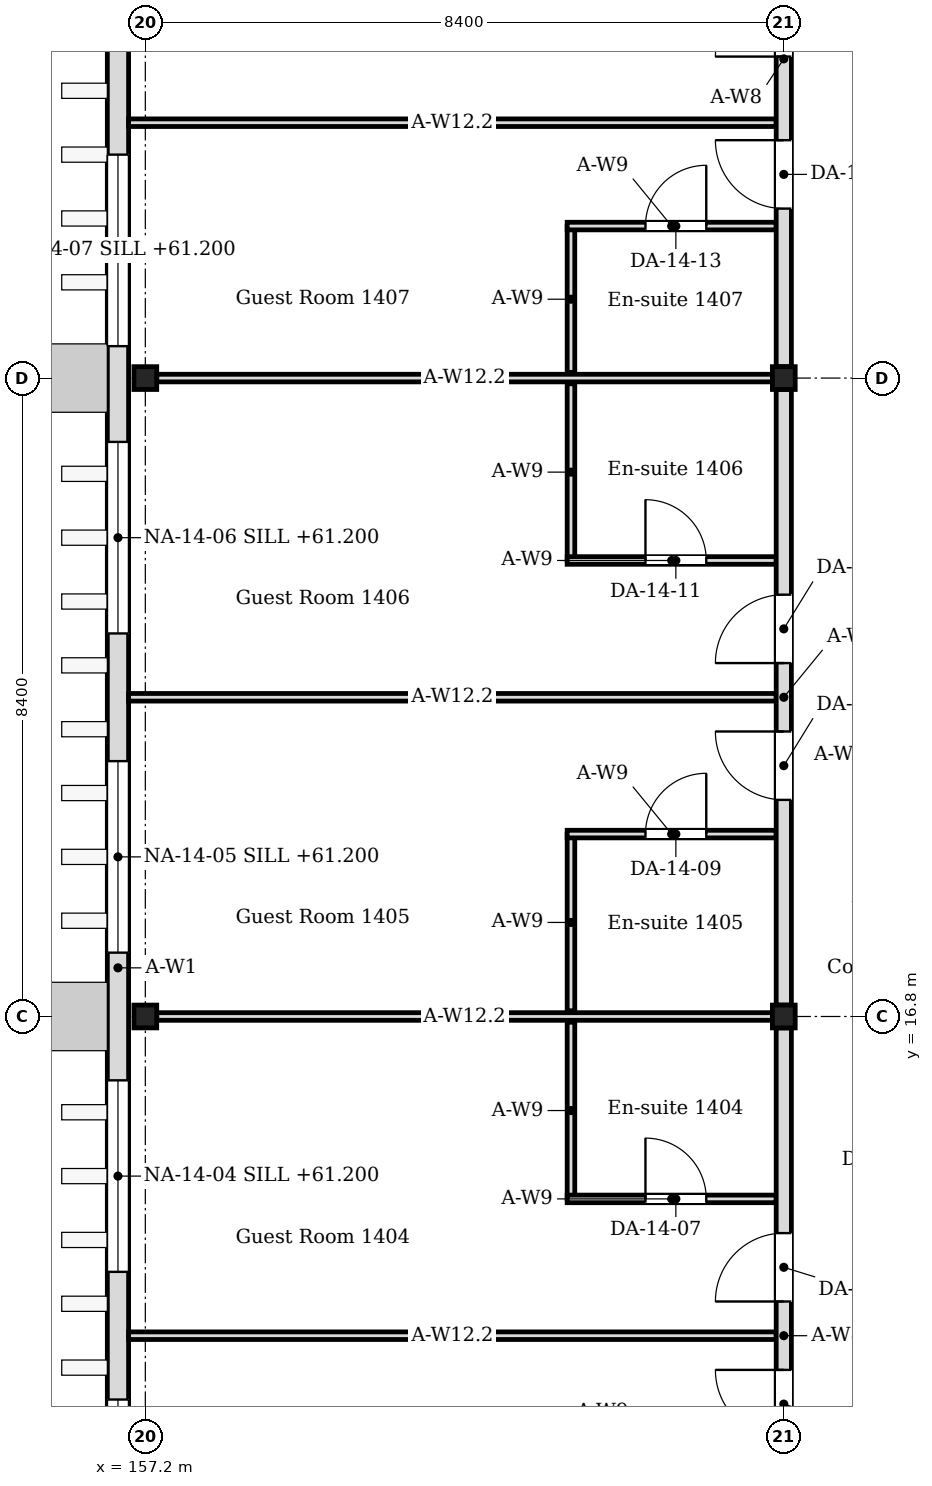
"""IFC4 building model, lengths in metres.
Left out: names, types, materials, properties, quantities, classifications, styles, units other than length and angle.
Written with IfcOpenShell. Run it as: python <this file> out.ifc"""

import sys

from ifc_helpers import new_model, si_unit, direction, frame, frame_2d, origin, origin_2d, place, context, subcontext, project, spatial, rectangle, i_section, extrude, element, fill, save


model = new_model("IFC4")
c1 = context("Model", 3, precision=1e-05, world=origin(), true_north=direction((0.0, 1.0)))
c2 = subcontext(c1, "Body", "Model", "MODEL_VIEW")
j1 = project(units=[si_unit("LENGTHUNIT", "METRE"), si_unit("PLANEANGLEUNIT", "RADIAN")], contexts=[c1])
p1 = place(None, origin())
s1 = spatial("IfcSite", under=j1, at=p1, CompositionType="ELEMENT")
p2 = place(p1, origin())
s2 = spatial("IfcBuilding", under=s1, at=p2, CompositionType="ELEMENT")
p3 = place(p2, frame((0.0, 0.0, 60.6)))
s3 = spatial("IfcBuildingStorey", under=s2, at=p3, CompositionType="ELEMENT", Elevation=60.6)
for number, where, z_axis, x_axis in (
    (1, (157.2, 16.8, 0.0), (0.0, 0.0, 1.0), (1.0, 0.0, 0.0)),
    (2, (157.2, 25.2, 0.0), (0.0, 0.0, 1.0), (1.0, 0.0, 0.0)),
    (3, (165.6, 16.8, 0.0), (0.0, 0.0, 1.0), (1.0, 0.0, 0.0)),
    (4, (165.6, 25.2, 0.0), (0.0, 0.0, 1.0), (1.0, 0.0, 0.0)),
):
    element("IfcColumn", number, at=place(p3, frame(where, z_axis=z_axis, x_axis=x_axis)), inside=s3, PredefinedType="COLUMN", context=c2, shape_type="SweptSolid", body=[
        extrude(i_section(OverallWidth=0.3, OverallDepth=0.3, WebThickness=0.01, FlangeThickness=0.015, FilletRadius=0.013, at=origin_2d()), origin(), (0.0, 0.0, 1.0), 4.2),
    ])
p4 = place(p3, frame((156.84, -0.22, 0.0), z_axis=(0.0, 0.0, 1.0), x_axis=(0.0, 1.0, 0.0)))
e5 = element("IfcWall", 5, at=p4, inside=s3, PredefinedType="SOLIDWALL", context=c2, shape_type="SweptSolid", body=[
    extrude(rectangle(XDim=67.64, YDim=0.28, at=frame_2d((33.82, 0.0))), origin(), (0.0, 0.0, 1.0), 4.05),
])
p5 = place(p4, frame((0.64, 0.0, 0.6)))
e6 = element("IfcOpeningElement", 6, at=p5, cuts=e5, PredefinedType="OPENING", context=c2, shape_type="SweptSolid", body=[
    extrude(rectangle(XDim=2.52, YDim=2.4, at=frame_2d((1.26, 1.2))), frame((0.0, 0.15, 0.0), z_axis=(0.0, -1.0, 0.0), x_axis=(1.0, 0.0, 0.0)), (0.0, 0.0, 1.0), 0.3),
])
p6 = place(p4, frame((4.84, 0.0, 0.6)))
e7 = element("IfcOpeningElement", 7, at=p6, cuts=e5, PredefinedType="OPENING", context=c2, shape_type="SweptSolid", body=[
    extrude(rectangle(XDim=2.52, YDim=2.4, at=frame_2d((1.26, 1.2))), frame((0.0, 0.15, 0.0), z_axis=(0.0, -1.0, 0.0), x_axis=(1.0, 0.0, 0.0)), (0.0, 0.0, 1.0), 0.3),
])
p7 = place(p4, frame((9.46, 0.0, 0.6)))
e8 = element("IfcOpeningElement", 8, at=p7, cuts=e5, PredefinedType="OPENING", context=c2, shape_type="SweptSolid", body=[
    extrude(rectangle(XDim=2.52, YDim=2.4, at=frame_2d((1.26, 1.2))), frame((0.0, 0.15, 0.0), z_axis=(0.0, -1.0, 0.0), x_axis=(1.0, 0.0, 0.0)), (0.0, 0.0, 1.0), 0.3),
])
p8 = place(p4, frame((13.66, 0.0, 0.6)))
e9 = element("IfcOpeningElement", 9, at=p8, cuts=e5, PredefinedType="OPENING", context=c2, shape_type="SweptSolid", body=[
    extrude(rectangle(XDim=2.52, YDim=2.4, at=frame_2d((1.26, 1.2))), frame((0.0, 0.15, 0.0), z_axis=(0.0, -1.0, 0.0), x_axis=(1.0, 0.0, 0.0)), (0.0, 0.0, 1.0), 0.3),
])
p9 = place(p4, frame((17.86, 0.0, 0.6)))
e10 = element("IfcOpeningElement", 10, at=p9, cuts=e5, PredefinedType="OPENING", context=c2, shape_type="SweptSolid", body=[
    extrude(rectangle(XDim=2.52, YDim=2.4, at=frame_2d((1.26, 1.2))), frame((0.0, 0.15, 0.0), z_axis=(0.0, -1.0, 0.0), x_axis=(1.0, 0.0, 0.0)), (0.0, 0.0, 1.0), 0.3),
])
p10 = place(p4, frame((22.06, 0.0, 0.6)))
e11 = element("IfcOpeningElement", 11, at=p10, cuts=e5, PredefinedType="OPENING", context=c2, shape_type="SweptSolid", body=[
    extrude(rectangle(XDim=2.52, YDim=2.4, at=frame_2d((1.26, 1.2))), frame((0.0, 0.15, 0.0), z_axis=(0.0, -1.0, 0.0), x_axis=(1.0, 0.0, 0.0)), (0.0, 0.0, 1.0), 0.3),
])
p11 = place(p4, frame((25.84, 0.0, 0.6)))
e12 = element("IfcOpeningElement", 12, at=p11, cuts=e5, PredefinedType="OPENING", context=c2, shape_type="SweptSolid", body=[
    extrude(rectangle(XDim=2.52, YDim=2.4, at=frame_2d((1.26, 1.2))), frame((0.0, 0.15, 0.0), z_axis=(0.0, -1.0, 0.0), x_axis=(1.0, 0.0, 0.0)), (0.0, 0.0, 1.0), 0.3),
])
p12 = place(p4, frame((30.04, 0.0, 0.6)))
e13 = element("IfcOpeningElement", 13, at=p12, cuts=e5, PredefinedType="OPENING", context=c2, shape_type="SweptSolid", body=[
    extrude(rectangle(XDim=2.52, YDim=2.4, at=frame_2d((1.26, 1.2))), frame((0.0, 0.15, 0.0), z_axis=(0.0, -1.0, 0.0), x_axis=(1.0, 0.0, 0.0)), (0.0, 0.0, 1.0), 0.3),
])
p13 = place(p4, frame((34.66, 0.0, 0.6)))
e14 = element("IfcOpeningElement", 14, at=p13, cuts=e5, PredefinedType="OPENING", context=c2, shape_type="SweptSolid", body=[
    extrude(rectangle(XDim=2.52, YDim=2.4, at=frame_2d((1.26, 1.2))), frame((0.0, 0.15, 0.0), z_axis=(0.0, -1.0, 0.0), x_axis=(1.0, 0.0, 0.0)), (0.0, 0.0, 1.0), 0.3),
])
p14 = place(p4, frame((38.86, 0.0, 0.6)))
e15 = element("IfcOpeningElement", 15, at=p14, cuts=e5, PredefinedType="OPENING", context=c2, shape_type="SweptSolid", body=[
    extrude(rectangle(XDim=2.52, YDim=2.4, at=frame_2d((1.26, 1.2))), frame((0.0, 0.15, 0.0), z_axis=(0.0, -1.0, 0.0), x_axis=(1.0, 0.0, 0.0)), (0.0, 0.0, 1.0), 0.3),
])
p15 = place(p4, frame((42.64, 0.0, 0.6)))
e16 = element("IfcOpeningElement", 16, at=p15, cuts=e5, PredefinedType="OPENING", context=c2, shape_type="SweptSolid", body=[
    extrude(rectangle(XDim=2.52, YDim=2.4, at=frame_2d((1.26, 1.2))), frame((0.0, 0.15, 0.0), z_axis=(0.0, -1.0, 0.0), x_axis=(1.0, 0.0, 0.0)), (0.0, 0.0, 1.0), 0.3),
])
p16 = place(p4, frame((46.84, 0.0, 0.6)))
e17 = element("IfcOpeningElement", 17, at=p16, cuts=e5, PredefinedType="OPENING", context=c2, shape_type="SweptSolid", body=[
    extrude(rectangle(XDim=2.52, YDim=2.4, at=frame_2d((1.26, 1.2))), frame((0.0, 0.15, 0.0), z_axis=(0.0, -1.0, 0.0), x_axis=(1.0, 0.0, 0.0)), (0.0, 0.0, 1.0), 0.3),
])
p17 = place(p4, frame((51.46, 0.0, 0.6)))
e18 = element("IfcOpeningElement", 18, at=p17, cuts=e5, PredefinedType="OPENING", context=c2, shape_type="SweptSolid", body=[
    extrude(rectangle(XDim=2.52, YDim=2.4, at=frame_2d((1.26, 1.2))), frame((0.0, 0.15, 0.0), z_axis=(0.0, -1.0, 0.0), x_axis=(1.0, 0.0, 0.0)), (0.0, 0.0, 1.0), 0.3),
])
p18 = place(p4, frame((55.66, 0.0, 0.6)))
e19 = element("IfcOpeningElement", 19, at=p18, cuts=e5, PredefinedType="OPENING", context=c2, shape_type="SweptSolid", body=[
    extrude(rectangle(XDim=2.52, YDim=2.4, at=frame_2d((1.26, 1.2))), frame((0.0, 0.15, 0.0), z_axis=(0.0, -1.0, 0.0), x_axis=(1.0, 0.0, 0.0)), (0.0, 0.0, 1.0), 0.3),
])
p19 = place(p4, frame((59.86, 0.0, 0.6)))
e20 = element("IfcOpeningElement", 20, at=p19, cuts=e5, PredefinedType="OPENING", context=c2, shape_type="SweptSolid", body=[
    extrude(rectangle(XDim=2.52, YDim=2.4, at=frame_2d((1.26, 1.2))), frame((0.0, 0.15, 0.0), z_axis=(0.0, -1.0, 0.0), x_axis=(1.0, 0.0, 0.0)), (0.0, 0.0, 1.0), 0.3),
])
p20 = place(p4, frame((64.06, 0.0, 0.6)))
e21 = element("IfcOpeningElement", 21, at=p20, cuts=e5, PredefinedType="OPENING", context=c2, shape_type="SweptSolid", body=[
    extrude(rectangle(XDim=2.52, YDim=2.4, at=frame_2d((1.26, 1.2))), frame((0.0, 0.15, 0.0), z_axis=(0.0, -1.0, 0.0), x_axis=(1.0, 0.0, 0.0)), (0.0, 0.0, 1.0), 0.3),
])
p21 = place(p3, frame((162.8, 14.4, 0.0), z_axis=(0.0, 0.0, 1.0), x_axis=(0.0, 1.0, 0.0)))
e22 = element("IfcWall", 22, at=p21, inside=s3, PredefinedType="PARTITIONING", context=c2, shape_type="SweptSolid", body=[
    extrude(rectangle(XDim=2.325, YDim=0.1, at=frame_2d((1.163, 0.0))), origin(), (0.0, 0.0, 1.0), 4.05),
])
p22 = place(p3, frame((162.75, 14.4, 0.0), z_axis=(0.0, 0.0, 1.0), x_axis=(1.0, 0.0, 0.0)))
e23 = element("IfcWall", 23, at=p22, inside=s3, PredefinedType="PARTITIONING", context=c2, shape_type="SweptSolid", body=[
    extrude(rectangle(XDim=2.75, YDim=0.1, at=frame_2d((1.375, 0.0))), origin(), (0.0, 0.0, 1.0), 4.05),
])
p23 = place(p22, frame((1.03, 0.0, 0.0)))
e24 = element("IfcOpeningElement", 24, at=p23, cuts=e23, PredefinedType="OPENING", context=c2, shape_type="SweptSolid", body=[
    extrude(rectangle(XDim=0.8, YDim=2.1, at=frame_2d((0.4, 1.05))), frame((0.0, 0.06, 0.0), z_axis=(0.0, -1.0, 0.0), x_axis=(1.0, 0.0, 0.0)), (0.0, 0.0, 1.0), 0.12),
])
p24 = place(p3, frame((162.8, 16.875, 0.0), z_axis=(0.0, 0.0, 1.0), x_axis=(0.0, 1.0, 0.0)))
e25 = element("IfcWall", 25, at=p24, inside=s3, PredefinedType="PARTITIONING", context=c2, shape_type="SweptSolid", body=[
    extrude(rectangle(XDim=2.325, YDim=0.1, at=frame_2d((1.163, 0.0))), origin(), (0.0, 0.0, 1.0), 4.05),
])
p25 = place(p3, frame((162.75, 19.2, 0.0), z_axis=(0.0, 0.0, 1.0), x_axis=(1.0, 0.0, 0.0)))
e26 = element("IfcWall", 26, at=p25, inside=s3, PredefinedType="PARTITIONING", context=c2, shape_type="SweptSolid", body=[
    extrude(rectangle(XDim=2.75, YDim=0.1, at=frame_2d((1.375, 0.0))), origin(), (0.0, 0.0, 1.0), 4.05),
])
p26 = place(p25, frame((1.03, 0.0, 0.0)))
e27 = element("IfcOpeningElement", 27, at=p26, cuts=e26, PredefinedType="OPENING", context=c2, shape_type="SweptSolid", body=[
    extrude(rectangle(XDim=0.8, YDim=2.1, at=frame_2d((0.4, 1.05))), frame((0.0, 0.06, 0.0), z_axis=(0.0, -1.0, 0.0), x_axis=(1.0, 0.0, 0.0)), (0.0, 0.0, 1.0), 0.12),
])
p27 = place(p3, frame((162.8, 22.8, 0.0), z_axis=(0.0, 0.0, 1.0), x_axis=(0.0, 1.0, 0.0)))
e28 = element("IfcWall", 28, at=p27, inside=s3, PredefinedType="PARTITIONING", context=c2, shape_type="SweptSolid", body=[
    extrude(rectangle(XDim=2.325, YDim=0.1, at=frame_2d((1.163, 0.0))), origin(), (0.0, 0.0, 1.0), 4.05),
])
p28 = place(p3, frame((162.75, 22.8, 0.0), z_axis=(0.0, 0.0, 1.0), x_axis=(1.0, 0.0, 0.0)))
e29 = element("IfcWall", 29, at=p28, inside=s3, PredefinedType="PARTITIONING", context=c2, shape_type="SweptSolid", body=[
    extrude(rectangle(XDim=2.75, YDim=0.1, at=frame_2d((1.375, 0.0))), origin(), (0.0, 0.0, 1.0), 4.05),
])
p29 = place(p28, frame((1.03, 0.0, 0.0)))
e30 = element("IfcOpeningElement", 30, at=p29, cuts=e29, PredefinedType="OPENING", context=c2, shape_type="SweptSolid", body=[
    extrude(rectangle(XDim=0.8, YDim=2.1, at=frame_2d((0.4, 1.05))), frame((0.0, 0.06, 0.0), z_axis=(0.0, -1.0, 0.0), x_axis=(1.0, 0.0, 0.0)), (0.0, 0.0, 1.0), 0.12),
])
p30 = place(p3, frame((162.8, 25.275, 0.0), z_axis=(0.0, 0.0, 1.0), x_axis=(0.0, 1.0, 0.0)))
e31 = element("IfcWall", 31, at=p30, inside=s3, PredefinedType="PARTITIONING", context=c2, shape_type="SweptSolid", body=[
    extrude(rectangle(XDim=1.925, YDim=0.1, at=frame_2d((0.962, 0.0))), origin(), (0.0, 0.0, 1.0), 4.05),
])
p31 = place(p3, frame((162.75, 27.2, 0.0), z_axis=(0.0, 0.0, 1.0), x_axis=(1.0, 0.0, 0.0)))
e32 = element("IfcWall", 32, at=p31, inside=s3, PredefinedType="PARTITIONING", context=c2, shape_type="SweptSolid", body=[
    extrude(rectangle(XDim=2.75, YDim=0.1, at=frame_2d((1.375, 0.0))), origin(), (0.0, 0.0, 1.0), 4.05),
])
p32 = place(p31, frame((1.03, 0.0, 0.0)))
e33 = element("IfcOpeningElement", 33, at=p32, cuts=e32, PredefinedType="OPENING", context=c2, shape_type="SweptSolid", body=[
    extrude(rectangle(XDim=0.8, YDim=2.1, at=frame_2d((0.4, 1.05))), frame((0.0, 0.06, 0.0), z_axis=(0.0, -1.0, 0.0), x_axis=(1.0, 0.0, 0.0)), (0.0, 0.0, 1.0), 0.12),
])
for number, where, z_axis, x_axis in (
    (34, (157.35, 16.8, 0.0), (0.0, 0.0, 1.0), (1.0, 0.0, 0.0)),
    (35, (157.35, 25.2, 0.0), (0.0, 0.0, 1.0), (1.0, 0.0, 0.0)),
):
    element("IfcWall", number, at=place(p3, frame(where, z_axis=z_axis, x_axis=x_axis)), inside=s3, PredefinedType="PARTITIONING", context=c2, shape_type="SweptSolid", body=[
        extrude(rectangle(XDim=8.1, YDim=0.1, at=frame_2d((4.05, 0.0))), origin(), (0.0, 0.0, 1.0), 3.55),
    ])
for number, where, z_axis, x_axis in (
    (36, (156.98, 12.6, 0.0), (0.0, 0.0, 1.0), (1.0, 0.0, 0.0)),
    (37, (156.98, 21.0, 0.0), (0.0, 0.0, 1.0), (1.0, 0.0, 0.0)),
    (38, (156.98, 28.56, 0.0), (0.0, 0.0, 1.0), (1.0, 0.0, 0.0)),
):
    element("IfcWall", number, at=place(p3, frame(where, z_axis=z_axis, x_axis=x_axis)), inside=s3, PredefinedType="PARTITIONING", context=c2, shape_type="SweptSolid", body=[
        extrude(rectangle(XDim=8.52, YDim=0.1, at=frame_2d((4.26, 0.0))), origin(), (0.0, 0.0, 1.0), 3.55),
    ])
p33 = place(p3, frame((165.6, 8.55, 0.0), z_axis=(0.0, 0.0, 1.0), x_axis=(0.0, 1.0, 0.0)))
e39 = element("IfcWall", 39, at=p33, inside=s3, PredefinedType="PARTITIONING", context=c2, shape_type="SweptSolid", body=[
    extrude(rectangle(XDim=8.1, YDim=0.2, at=frame_2d((4.05, 0.0))), origin(), (0.0, 0.0, 1.0), 3.45),
])
p34 = place(p33, frame((2.7, 0.0, 0.0)))
e40 = element("IfcOpeningElement", 40, at=p34, cuts=e39, PredefinedType="OPENING", context=c2, shape_type="SweptSolid", body=[
    extrude(rectangle(XDim=0.9, YDim=2.1, at=frame_2d((0.45, 1.05))), frame((0.0, 0.11, 0.0), z_axis=(0.0, -1.0, 0.0), x_axis=(1.0, 0.0, 0.0)), (0.0, 0.0, 1.0), 0.22),
])
p35 = place(p33, frame((4.5, 0.0, 0.0)))
e41 = element("IfcOpeningElement", 41, at=p35, cuts=e39, PredefinedType="OPENING", context=c2, shape_type="SweptSolid", body=[
    extrude(rectangle(XDim=0.9, YDim=2.1, at=frame_2d((0.45, 1.05))), frame((0.0, 0.11, 0.0), z_axis=(0.0, -1.0, 0.0), x_axis=(1.0, 0.0, 0.0)), (0.0, 0.0, 1.0), 0.22),
])
p36 = place(p3, frame((165.6, 16.95, 0.0), z_axis=(0.0, 0.0, 1.0), x_axis=(0.0, 1.0, 0.0)))
e42 = element("IfcWall", 42, at=p36, inside=s3, PredefinedType="PARTITIONING", context=c2, shape_type="SweptSolid", body=[
    extrude(rectangle(XDim=8.1, YDim=0.2, at=frame_2d((4.05, 0.0))), origin(), (0.0, 0.0, 1.0), 3.45),
])
p37 = place(p36, frame((2.7, 0.0, 0.0)))
e43 = element("IfcOpeningElement", 43, at=p37, cuts=e42, PredefinedType="OPENING", context=c2, shape_type="SweptSolid", body=[
    extrude(rectangle(XDim=0.9, YDim=2.1, at=frame_2d((0.45, 1.05))), frame((0.0, 0.11, 0.0), z_axis=(0.0, -1.0, 0.0), x_axis=(1.0, 0.0, 0.0)), (0.0, 0.0, 1.0), 0.22),
])
p38 = place(p36, frame((4.5, 0.0, 0.0)))
e44 = element("IfcOpeningElement", 44, at=p38, cuts=e42, PredefinedType="OPENING", context=c2, shape_type="SweptSolid", body=[
    extrude(rectangle(XDim=0.9, YDim=2.1, at=frame_2d((0.45, 1.05))), frame((0.0, 0.11, 0.0), z_axis=(0.0, -1.0, 0.0), x_axis=(1.0, 0.0, 0.0)), (0.0, 0.0, 1.0), 0.22),
])
p39 = place(p3, frame((165.6, 25.35, 0.0), z_axis=(0.0, 0.0, 1.0), x_axis=(0.0, 1.0, 0.0)))
e45 = element("IfcWall", 45, at=p39, inside=s3, PredefinedType="PARTITIONING", context=c2, shape_type="SweptSolid", body=[
    extrude(rectangle(XDim=8.1, YDim=0.2, at=frame_2d((4.05, 0.0))), origin(), (0.0, 0.0, 1.0), 3.45),
])
p40 = place(p39, frame((2.08, 0.0, 0.0)))
e46 = element("IfcOpeningElement", 46, at=p40, cuts=e45, PredefinedType="OPENING", context=c2, shape_type="SweptSolid", body=[
    extrude(rectangle(XDim=0.9, YDim=2.1, at=frame_2d((0.45, 1.05))), frame((0.0, 0.11, 0.0), z_axis=(0.0, -1.0, 0.0), x_axis=(1.0, 0.0, 0.0)), (0.0, 0.0, 1.0), 0.22),
])
p41 = place(p39, frame((4.08, 0.0, 0.0)))
e47 = element("IfcOpeningElement", 47, at=p41, cuts=e45, PredefinedType="OPENING", context=c2, shape_type="SweptSolid", body=[
    extrude(rectangle(XDim=0.9, YDim=2.1, at=frame_2d((0.45, 1.05))), frame((0.0, 0.11, 0.0), z_axis=(0.0, -1.0, 0.0), x_axis=(1.0, 0.0, 0.0)), (0.0, 0.0, 1.0), 0.22),
])
p42 = place(p7, origin())
e48 = element("IfcWindow", 48, at=p42, inside=s3, PartitioningType="SINGLE_PANEL", PredefinedType="WINDOW", context=c2, shape_type="SweptSolid", body=[
    extrude(rectangle(XDim=2.52, YDim=2.4, at=frame_2d((1.26, 1.2))), frame((0.0, 0.03, 0.0), z_axis=(0.0, -1.0, 0.0), x_axis=(1.0, 0.0, 0.0)), (0.0, 0.0, 1.0), 0.06),
])
fill(e8, e48)
p43 = place(p8, origin())
e49 = element("IfcWindow", 49, at=p43, inside=s3, PartitioningType="SINGLE_PANEL", PredefinedType="WINDOW", context=c2, shape_type="SweptSolid", body=[
    extrude(rectangle(XDim=2.52, YDim=2.4, at=frame_2d((1.26, 1.2))), frame((0.0, 0.03, 0.0), z_axis=(0.0, -1.0, 0.0), x_axis=(1.0, 0.0, 0.0)), (0.0, 0.0, 1.0), 0.06),
])
fill(e9, e49)
p44 = place(p9, origin())
e50 = element("IfcWindow", 50, at=p44, inside=s3, PartitioningType="SINGLE_PANEL", PredefinedType="WINDOW", context=c2, shape_type="SweptSolid", body=[
    extrude(rectangle(XDim=2.52, YDim=2.4, at=frame_2d((1.26, 1.2))), frame((0.0, 0.03, 0.0), z_axis=(0.0, -1.0, 0.0), x_axis=(1.0, 0.0, 0.0)), (0.0, 0.0, 1.0), 0.06),
])
fill(e10, e50)
p45 = place(p10, origin())
e51 = element("IfcWindow", 51, at=p45, inside=s3, PartitioningType="SINGLE_PANEL", PredefinedType="WINDOW", context=c2, shape_type="SweptSolid", body=[
    extrude(rectangle(XDim=2.52, YDim=2.4, at=frame_2d((1.26, 1.2))), frame((0.0, 0.03, 0.0), z_axis=(0.0, -1.0, 0.0), x_axis=(1.0, 0.0, 0.0)), (0.0, 0.0, 1.0), 0.06),
])
fill(e11, e51)
p46 = place(p11, origin())
e52 = element("IfcWindow", 52, at=p46, inside=s3, PartitioningType="SINGLE_PANEL", PredefinedType="WINDOW", context=c2, shape_type="SweptSolid", body=[
    extrude(rectangle(XDim=2.52, YDim=2.4, at=frame_2d((1.26, 1.2))), frame((0.0, 0.03, 0.0), z_axis=(0.0, -1.0, 0.0), x_axis=(1.0, 0.0, 0.0)), (0.0, 0.0, 1.0), 0.06),
])
fill(e12, e52)
p47 = place(p34, origin())
e53 = element("IfcDoor", 53, at=p47, inside=s3, OperationType="SINGLE_SWING_RIGHT", PredefinedType="DOOR", context=c2, shape_type="SweptSolid", body=[
    extrude(rectangle(XDim=0.9, YDim=2.1, at=frame_2d((0.45, 1.05))), frame((0.0, 0.025, 0.0), z_axis=(0.0, -1.0, 0.0), x_axis=(1.0, 0.0, 0.0)), (0.0, 0.0, 1.0), 0.05),
])
fill(e40, e53)
p48 = place(p23, origin())
e54 = element("IfcDoor", 54, at=p48, inside=s3, OperationType="SINGLE_SWING_LEFT", PredefinedType="DOOR", context=c2, shape_type="SweptSolid", body=[
    extrude(rectangle(XDim=0.8, YDim=2.1, at=frame_2d((0.4, 1.05))), frame((0.0, 0.025, 0.0), z_axis=(0.0, -1.0, 0.0), x_axis=(1.0, 0.0, 0.0)), (0.0, 0.0, 1.0), 0.05),
])
fill(e24, e54)
p49 = place(p35, origin())
e55 = element("IfcDoor", 55, at=p49, inside=s3, OperationType="SINGLE_SWING_LEFT", PredefinedType="DOOR", context=c2, shape_type="SweptSolid", body=[
    extrude(rectangle(XDim=0.9, YDim=2.1, at=frame_2d((0.45, 1.05))), frame((0.0, 0.025, 0.0), z_axis=(0.0, -1.0, 0.0), x_axis=(1.0, 0.0, 0.0)), (0.0, 0.0, 1.0), 0.05),
])
fill(e41, e55)
p50 = place(p26, origin())
e56 = element("IfcDoor", 56, at=p50, inside=s3, OperationType="SINGLE_SWING_RIGHT", PredefinedType="DOOR", context=c2, shape_type="SweptSolid", body=[
    extrude(rectangle(XDim=0.8, YDim=2.1, at=frame_2d((0.4, 1.05))), frame((0.0, 0.025, 0.0), z_axis=(0.0, -1.0, 0.0), x_axis=(1.0, 0.0, 0.0)), (0.0, 0.0, 1.0), 0.05),
])
fill(e27, e56)
p51 = place(p37, origin())
e57 = element("IfcDoor", 57, at=p51, inside=s3, OperationType="SINGLE_SWING_RIGHT", PredefinedType="DOOR", context=c2, shape_type="SweptSolid", body=[
    extrude(rectangle(XDim=0.9, YDim=2.1, at=frame_2d((0.45, 1.05))), frame((0.0, 0.025, 0.0), z_axis=(0.0, -1.0, 0.0), x_axis=(1.0, 0.0, 0.0)), (0.0, 0.0, 1.0), 0.05),
])
fill(e43, e57)
p52 = place(p29, origin())
e58 = element("IfcDoor", 58, at=p52, inside=s3, OperationType="SINGLE_SWING_LEFT", PredefinedType="DOOR", context=c2, shape_type="SweptSolid", body=[
    extrude(rectangle(XDim=0.8, YDim=2.1, at=frame_2d((0.4, 1.05))), frame((0.0, 0.025, 0.0), z_axis=(0.0, -1.0, 0.0), x_axis=(1.0, 0.0, 0.0)), (0.0, 0.0, 1.0), 0.05),
])
fill(e30, e58)
p53 = place(p38, origin())
e59 = element("IfcDoor", 59, at=p53, inside=s3, OperationType="SINGLE_SWING_LEFT", PredefinedType="DOOR", context=c2, shape_type="SweptSolid", body=[
    extrude(rectangle(XDim=0.9, YDim=2.1, at=frame_2d((0.45, 1.05))), frame((0.0, 0.025, 0.0), z_axis=(0.0, -1.0, 0.0), x_axis=(1.0, 0.0, 0.0)), (0.0, 0.0, 1.0), 0.05),
])
fill(e44, e59)
p54 = place(p32, origin())
e60 = element("IfcDoor", 60, at=p54, inside=s3, OperationType="SINGLE_SWING_RIGHT", PredefinedType="DOOR", context=c2, shape_type="SweptSolid", body=[
    extrude(rectangle(XDim=0.8, YDim=2.1, at=frame_2d((0.4, 1.05))), frame((0.0, 0.025, 0.0), z_axis=(0.0, -1.0, 0.0), x_axis=(1.0, 0.0, 0.0)), (0.0, 0.0, 1.0), 0.05),
])
fill(e33, e60)
p55 = place(p40, origin())
e61 = element("IfcDoor", 61, at=p55, inside=s3, OperationType="SINGLE_SWING_RIGHT", PredefinedType="DOOR", context=c2, shape_type="SweptSolid", body=[
    extrude(rectangle(XDim=0.9, YDim=2.1, at=frame_2d((0.45, 1.05))), frame((0.0, 0.025, 0.0), z_axis=(0.0, -1.0, 0.0), x_axis=(1.0, 0.0, 0.0)), (0.0, 0.0, 1.0), 0.05),
])
fill(e46, e61)
p56 = place(p41, origin())
e62 = element("IfcDoor", 62, at=p56, inside=s3, OperationType="SINGLE_SWING_LEFT", PredefinedType="DOOR", context=c2, shape_type="SweptSolid", body=[
    extrude(rectangle(XDim=0.9, YDim=2.1, at=frame_2d((0.45, 1.05))), frame((0.0, 0.025, 0.0), z_axis=(0.0, -1.0, 0.0), x_axis=(1.0, 0.0, 0.0)), (0.0, 0.0, 1.0), 0.05),
])
fill(e47, e62)
save(model, sys.argv[1])
